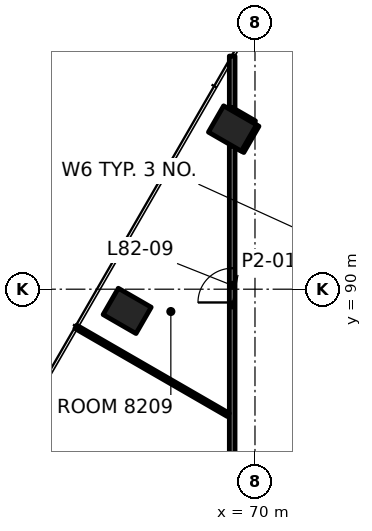
"""IFC4 building model, lengths in metres.
Left out: names, types, materials, properties, quantities, classifications, styles, units other than length and angle.
Written with IfcOpenShell. Run it as: python <this file> out.ifc"""

import sys

from ifc_helpers import new_model, si_unit, direction, frame, frame_2d, origin, origin_2d, place, context, subcontext, project, spatial, rectangle, hollow_rectangle, extrude, element, fill, save


model = new_model("IFC4")
c1 = context("Model", 3, precision=1e-05, world=origin(), true_north=direction((0.0, 1.0)))
c2 = subcontext(c1, "Body", "Model", "MODEL_VIEW")
j1 = project(units=[si_unit("LENGTHUNIT", "METRE"), si_unit("PLANEANGLEUNIT", "RADIAN")], contexts=[c1])
p1 = place(None, origin())
s1 = spatial("IfcSite", under=j1, at=p1, CompositionType="ELEMENT")
p2 = place(p1, origin())
s2 = spatial("IfcBuilding", under=s1, at=p2, CompositionType="ELEMENT")
p3 = place(p2, frame((0.0, 0.0, 335.6)))
s3 = spatial("IfcBuildingStorey", under=s2, at=p3, CompositionType="ELEMENT", Elevation=335.6)
for number, where, z_axis, x_axis in (
    (1, (69.408, 94.229, -0.0), (0.0, 0.0, 1.0), (-0.5, -0.866, 0.0)),
    (2, (66.636, 89.429, -0.0), (0.0, 0.0, 1.0), (-0.5, -0.866, 0.0)),
):
    element("IfcColumn", number, at=place(p3, frame(where, z_axis=z_axis, x_axis=x_axis)), inside=s3, PredefinedType="COLUMN", context=c2, shape_type="SweptSolid", body=[
        extrude(hollow_rectangle(XDim=0.8, YDim=1.0, WallThickness=0.05, at=origin_2d()), origin(), (0.0, 0.0, 1.0), 3.701),
    ])
p4 = place(p3, frame((69.641, 93.634, 0.0), z_axis=(0.0, 0.0, 1.0), x_axis=(0.500048565365, 0.865997362742, 0.0)))
e3 = element("IfcWall", 3, at=p4, inside=s3, PredefinedType="PARTITIONING", context=c2, shape_type="SweptSolid", body=[
    extrude(rectangle(XDim=0.799, YDim=0.15, at=frame_2d((0.4, 0.0))), origin(), (0.0, 0.0, 1.0), 3.1),
])
p5 = place(p3, frame((69.4, 85.4, 0.0), z_axis=(0.0, 0.0, 1.0), x_axis=(0.0, 1.0, 0.0)))
e4 = element("IfcWall", 4, at=p5, inside=s3, PredefinedType="PARTITIONING", context=c2, shape_type="SweptSolid", body=[
    extrude(rectangle(XDim=8.371, YDim=0.15, at=frame_2d((4.186, 0.0))), origin(), (0.0, 0.0, 1.0), 3.1),
])
p6 = place(p5, frame((4.25, 0.0, 0.0)))
e5 = element("IfcOpeningElement", 5, at=p6, cuts=e4, PredefinedType="OPENING", context=c2, shape_type="SweptSolid", body=[
    extrude(rectangle(XDim=0.9, YDim=2.1, at=frame_2d((0.45, 1.05))), frame((0.0, 0.085, 0.0), z_axis=(0.0, -1.0, 0.0), x_axis=(1.0, 0.0, 0.0)), (0.0, 0.0, 1.0), 0.17),
])
p7 = place(p3, frame((69.4, 94.783, 0.0), z_axis=(0.0, 0.0, 1.0), x_axis=(0.0, 1.0, 0.0)))
e6 = element("IfcWall", 6, at=p7, inside=s3, PredefinedType="PARTITIONING", context=c2, shape_type="SweptSolid", body=[
    extrude(rectangle(XDim=1.353, YDim=0.15, at=frame_2d((0.676, 0.0))), origin(), (0.0, 0.0, 1.0), 3.1),
])
p8 = place(p3, frame((69.976, 94.364, 0.0), z_axis=(0.0, 0.0, 1.0), x_axis=(-0.865995903571, 0.500051092388, 0.0)))
e7 = element("IfcWall", 7, at=p8, inside=s3, PredefinedType="PARTITIONING", context=c2, shape_type="SweptSolid", body=[
    extrude(rectangle(XDim=0.665, YDim=0.15, at=frame_2d((0.332, 0.0))), origin(), (0.0, 0.0, 1.0), 3.1),
])
p9 = place(p3, frame((69.299, 86.692, 0.0), z_axis=(0.0, 0.0, 1.0), x_axis=(-0.866003985137, 0.500037096351, 0.0)))
e8 = element("IfcWall", 8, at=p9, inside=s3, PredefinedType="PARTITIONING", context=c2, shape_type="SweptSolid", body=[
    extrude(rectangle(XDim=4.635, YDim=0.1, at=frame_2d((2.317, 0.0))), origin(), (0.0, 0.0, 1.0), 3.088),
])
p10 = place(p6, origin())
e9 = element("IfcDoor", 9, at=p10, inside=s3, OperationType="SINGLE_SWING_RIGHT", PredefinedType="DOOR", context=c2, shape_type="SweptSolid", body=[
    extrude(rectangle(XDim=0.9, YDim=2.1, at=frame_2d((0.45, 1.05))), frame((0.0, 0.025, 0.0), z_axis=(0.0, -1.0, 0.0), x_axis=(1.0, 0.0, 0.0)), (0.0, 0.0, 1.0), 0.05),
])
fill(e5, e9)
save(model, sys.argv[1])
